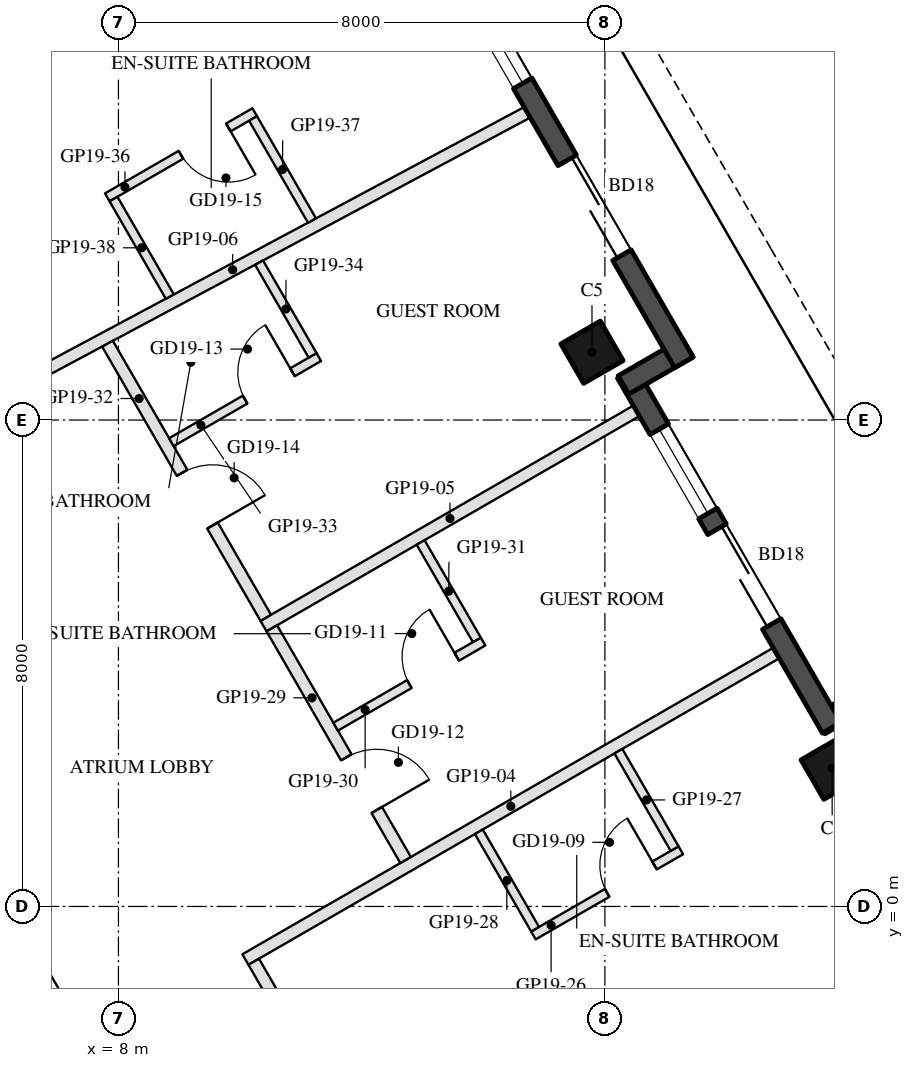
"""IFC4 building model, lengths in metres.
Left out: names, types, materials, properties, quantities, classifications, styles, units other than length and angle.
Written with IfcOpenShell. Run it as: python <this file> out.ifc"""

import sys

from ifc_helpers import new_model, si_unit, direction, frame, frame_2d, origin, origin_2d, place, context, subcontext, project, spatial, rectangle, hollow_rectangle, extrude, element, fill, save


model = new_model("IFC4")
c1 = context("Model", 3, precision=1e-05, world=origin(), true_north=direction((0.0, 1.0)))
c2 = subcontext(c1, "Body", "Model", "MODEL_VIEW")
j1 = project(units=[si_unit("LENGTHUNIT", "METRE"), si_unit("PLANEANGLEUNIT", "RADIAN")], contexts=[c1])
p1 = place(None, origin())
s1 = spatial("IfcSite", under=j1, at=p1, CompositionType="ELEMENT")
p2 = place(p1, origin())
s2 = spatial("IfcBuilding", under=s1, at=p2, CompositionType="ELEMENT")
p3 = place(p2, frame((0.0, 0.0, 202.1)))
s3 = spatial("IfcBuildingStorey", under=s2, at=p3, CompositionType="ELEMENT", Elevation=202.1)
for number, where, z_axis, x_axis in (
    (1, (19.738, 2.273, 0.0), (0.0, 0.0, 1.0), (-0.5, 0.866, 0.0)),
    (2, (15.788, 9.115, 0.0), (0.0, 0.0, 1.0), (-0.5, 0.866, 0.0)),
):
    element("IfcColumn", number, at=place(p3, frame(where, z_axis=z_axis, x_axis=x_axis)), inside=s3, PredefinedType="COLUMN", context=c2, shape_type="SweptSolid", body=[
        extrude(hollow_rectangle(XDim=0.75, YDim=0.75, WallThickness=0.035, at=origin_2d()), origin(), (0.0, 0.0, 1.0), 3.7),
    ])
p4 = place(p3, frame((20.588, 3.601, 0.0), z_axis=(0.0, 0.0, 1.0), x_axis=(-0.866005645448, -0.500034220881, 0.0)))
e3 = element("IfcWall", 3, at=p4, inside=s3, PredefinedType="SOLIDWALL", context=c2, shape_type="SweptSolid", body=[
    extrude(rectangle(XDim=1.22, YDim=0.35, at=frame_2d((0.61, 0.0))), origin(), (0.0, 0.0, 1.0), 3.55),
])
p5 = place(p3, frame((19.729, 2.938, 0.0), z_axis=(0.0, 0.0, 1.0), x_axis=(-0.499976430342, 0.866039011305, 0.0)))
e4 = element("IfcWall", 4, at=p5, inside=s3, PredefinedType="SOLIDWALL", context=c2, shape_type="SweptSolid", body=[
    extrude(rectangle(XDim=6.74, YDim=0.35, at=frame_2d((3.37, 0.0))), origin(), (0.0, 0.0, 1.0), 3.55),
])
p6 = place(p5, frame((1.97, 0.0, 0.0)))
e5 = element("IfcOpeningElement", 5, at=p6, cuts=e4, PredefinedType="OPENING", context=c2, shape_type="SweptSolid", body=[
    extrude(rectangle(XDim=1.8, YDim=2.4, at=frame_2d((0.9, 1.2))), frame((0.0, 0.185, 0.0), z_axis=(0.0, -1.0, 0.0), x_axis=(1.0, 0.0, 0.0)), (0.0, 0.0, 1.0), 0.37),
])
p7 = place(p5, frame((4.07, 0.0, 0.3)))
e6 = element("IfcOpeningElement", 6, at=p7, cuts=e4, PredefinedType="OPENING", context=c2, shape_type="SweptSolid", body=[
    extrude(rectangle(XDim=1.6, YDim=2.65, at=frame_2d((0.8, 1.325))), frame((0.0, 0.185, 0.0), z_axis=(0.0, -1.0, 0.0), x_axis=(1.0, 0.0, 0.0)), (0.0, 0.0, 1.0), 0.37),
])
p8 = place(p3, frame((16.306, 8.577, 0.0), z_axis=(0.0, 0.0, 1.0), x_axis=(0.866092288191, 0.499884134912, 0.0)))
e7 = element("IfcWall", 7, at=p8, inside=s3, PredefinedType="SOLIDWALL", context=c2, shape_type="SweptSolid", body=[
    extrude(rectangle(XDim=1.22, YDim=0.35, at=frame_2d((0.61, 0.0))), origin(), (0.0, 0.0, 1.0), 3.55),
])
p9 = place(p3, frame((17.299, 8.948, 0.0), z_axis=(0.0, 0.0, 1.0), x_axis=(-0.500010041276, 0.866019606374, 0.0)))
e8 = element("IfcWall", 8, at=p9, inside=s3, PredefinedType="SOLIDWALL", context=c2, shape_type="SweptSolid", body=[
    extrude(rectangle(XDim=9.7, YDim=0.35, at=frame_2d((4.85, 0.0))), origin(), (0.0, 0.0, 1.0), 3.55),
])
p10 = place(p9, frame((2.037, 0.0, 0.0)))
e9 = element("IfcOpeningElement", 9, at=p10, cuts=e8, PredefinedType="OPENING", context=c2, shape_type="SweptSolid", body=[
    extrude(rectangle(XDim=1.8, YDim=2.4, at=frame_2d((0.9, 1.2))), frame((0.0, 0.185, 0.0), z_axis=(0.0, -1.0, 0.0), x_axis=(1.0, 0.0, 0.0)), (0.0, 0.0, 1.0), 0.37),
])
p11 = place(p9, frame((5.3, 0.0, 0.3)))
e10 = element("IfcOpeningElement", 10, at=p11, cuts=e8, PredefinedType="OPENING", context=c2, shape_type="SweptSolid", body=[
    extrude(rectangle(XDim=2.7, YDim=2.65, at=frame_2d((1.35, 1.325))), frame((0.0, 0.185, 0.0), z_axis=(0.0, -1.0, 0.0), x_axis=(1.0, 0.0, 0.0)), (0.0, 0.0, 1.0), 0.37),
])
p12 = place(p3, frame((18.818, 4.167, 0.0), z_axis=(0.0, 0.0, 1.0), x_axis=(-0.866039179741, -0.499976138585, 0.0)))
e11 = element("IfcWall", 11, at=p12, inside=s3, PredefinedType="PARTITIONING", context=c2, shape_type="SweptSolid", body=[
    extrude(rectangle(XDim=10.08, YDim=0.2, at=frame_2d((5.04, 0.0))), origin(), (0.0, 0.0, 1.0), 3.06),
])
p13 = place(p3, frame((16.518, 8.151, 0.0), z_axis=(0.0, 0.0, 1.0), x_axis=(-0.866027673501, -0.499996068715, 0.0)))
e12 = element("IfcWall", 12, at=p13, inside=s3, PredefinedType="PARTITIONING", context=c2, shape_type="SweptSolid", body=[
    extrude(rectangle(XDim=7.08, YDim=0.2, at=frame_2d((3.54, 0.0))), origin(), (0.0, 0.0, 1.0), 3.06),
])
p14 = place(p3, frame((14.722, 13.061, 0.0), z_axis=(0.0, 0.0, 1.0), x_axis=(-0.881785716662, -0.471650241059, 0.0)))
e13 = element("IfcWall", 13, at=p14, inside=s3, PredefinedType="PARTITIONING", context=c2, shape_type="SweptSolid", body=[
    extrude(rectangle(XDim=10.986, YDim=0.2, at=frame_2d((5.493, 0.0))), origin(), (0.0, 0.0, 1.0), 2.95),
])
p15 = place(p3, frame((10.225, -0.909, 0.0), z_axis=(0.0, 0.0, 1.0), x_axis=(0.500011931275, -0.86601851515, 0.0)))
e14 = element("IfcWall", 14, at=p15, inside=s3, PredefinedType="PARTITIONING", context=c2, shape_type="SweptSolid", body=[
    extrude(rectangle(XDim=4.088, YDim=0.2, at=frame_2d((2.044, 0.0))), origin(), (0.0, 0.0, 1.0), 2.95),
])
p16 = place(p15, frame((1.544, 0.0, 0.0)))
e15 = element("IfcOpeningElement", 15, at=p16, cuts=e14, PredefinedType="OPENING", context=c2, shape_type="SweptSolid", body=[
    extrude(rectangle(XDim=1.0, YDim=2.1, at=frame_2d((0.5, 1.05))), frame((0.0, 0.11, 0.0), z_axis=(0.0, -1.0, 0.0), x_axis=(1.0, 0.0, 0.0)), (0.0, 0.0, 1.0), 0.22),
])
p17 = place(p3, frame((14.824, -0.477, 0.0), z_axis=(0.0, 0.0, 1.0), x_axis=(0.866034573852, 0.49998411664, 0.0)))
e16 = element("IfcWall", 16, at=p17, inside=s3, PredefinedType="PARTITIONING", context=c2, shape_type="SweptSolid", body=[
    extrude(rectangle(XDim=2.8, YDim=0.15, at=frame_2d((1.4, 0.0))), origin(), (0.0, 0.0, 1.0), 2.95),
])
p18 = place(p17, frame((1.4, 0.0, 0.0)))
e17 = element("IfcOpeningElement", 17, at=p18, cuts=e16, PredefinedType="OPENING", context=c2, shape_type="SweptSolid", body=[
    extrude(rectangle(XDim=0.9, YDim=2.1, at=frame_2d((0.45, 1.05))), frame((0.0, 0.085, 0.0), z_axis=(0.0, -1.0, 0.0), x_axis=(1.0, 0.0, 0.0)), (0.0, 0.0, 1.0), 0.17),
])
for number, where, z_axis, x_axis in (
    (18, (17.147, 0.951, 0.0), (0.0, 0.0, 1.0), (-0.5, 0.866, 0.0)),
    (19, (14.852, -0.374, 0.0), (0.0, 0.0, 1.0), (-0.5, 0.866, 0.0)),
):
    element("IfcWall", number, at=place(p3, frame(where, z_axis=z_axis, x_axis=x_axis)), inside=s3, PredefinedType="PARTITIONING", context=c2, shape_type="SweptSolid", body=[
        extrude(rectangle(XDim=1.85, YDim=0.15, at=frame_2d((0.925, 0.0))), origin(), (0.0, 0.0, 1.0), 3.55),
    ])
p19 = place(p3, frame((10.523, 4.574, 0.0), z_axis=(0.0, 0.0, 1.0), x_axis=(0.499988222896, -0.866032203192, 0.0)))
e20 = element("IfcWall", 20, at=p19, inside=s3, PredefinedType="PARTITIONING", context=c2, shape_type="SweptSolid", body=[
    extrude(rectangle(XDim=4.4, YDim=0.2, at=frame_2d((2.2, 0.0))), origin(), (0.0, 0.0, 1.0), 2.95),
])
p20 = place(p19, frame((2.45, 0.0, 0.0)))
e21 = element("IfcOpeningElement", 21, at=p20, cuts=e20, PredefinedType="OPENING", context=c2, shape_type="SweptSolid", body=[
    extrude(rectangle(XDim=1.0, YDim=2.1, at=frame_2d((0.5, 1.05))), frame((0.0, 0.11, 0.0), z_axis=(0.0, -1.0, 0.0), x_axis=(1.0, 0.0, 0.0)), (0.0, 0.0, 1.0), 0.22),
])
p21 = place(p3, frame((11.572, 2.957, 0.0), z_axis=(0.0, 0.0, 1.0), x_axis=(0.865996816683, 0.500049511043, 0.0)))
e22 = element("IfcWall", 22, at=p21, inside=s3, PredefinedType="PARTITIONING", context=c2, shape_type="SweptSolid", body=[
    extrude(rectangle(XDim=2.8, YDim=0.15, at=frame_2d((1.4, 0.0))), origin(), (0.0, 0.0, 1.0), 3.55),
])
p22 = place(p21, frame((1.4, 0.0, 0.0)))
e23 = element("IfcOpeningElement", 23, at=p22, cuts=e22, PredefinedType="OPENING", context=c2, shape_type="SweptSolid", body=[
    extrude(rectangle(XDim=0.9, YDim=2.1, at=frame_2d((0.45, 1.05))), frame((0.0, 0.085, 0.0), z_axis=(0.0, -1.0, 0.0), x_axis=(1.0, 0.0, 0.0)), (0.0, 0.0, 1.0), 0.17),
])
p23 = place(p3, frame((13.894, 4.385, 0.0), z_axis=(0.0, 0.0, 1.0), x_axis=(-0.499985172903, 0.866033964044, 0.0)))
e24 = element("IfcWall", 24, at=p23, inside=s3, PredefinedType="PARTITIONING", context=c2, shape_type="SweptSolid", body=[
    extrude(rectangle(XDim=1.85, YDim=0.15, at=frame_2d((0.925, 0.0))), origin(), (0.0, 0.0, 1.0), 3.55),
])
p24 = place(p3, frame((7.82, 9.256, 0.0), z_axis=(0.0, 0.0, 1.0), x_axis=(0.499987686533, -0.866032512851, 0.0)))
e25 = element("IfcWall", 25, at=p24, inside=s3, PredefinedType="PARTITIONING", context=c2, shape_type="SweptSolid", body=[
    extrude(rectangle(XDim=5.206, YDim=0.2, at=frame_2d((2.603, 0.0))), origin(), (0.0, 0.0, 1.0), 2.95),
])
p25 = place(p24, frame((2.453, 0.0, 0.0)))
e26 = element("IfcOpeningElement", 26, at=p25, cuts=e25, PredefinedType="OPENING", context=c2, shape_type="SweptSolid", body=[
    extrude(rectangle(XDim=1.0, YDim=2.1, at=frame_2d((0.5, 1.05))), frame((0.0, 0.11, 0.0), z_axis=(0.0, -1.0, 0.0), x_axis=(1.0, 0.0, 0.0)), (0.0, 0.0, 1.0), 0.22),
])
p26 = place(p3, frame((8.871, 7.636, 0.0), z_axis=(0.0, 0.0, 1.0), x_axis=(0.865996816683, 0.500049511043, 0.0)))
e27 = element("IfcWall", 27, at=p26, inside=s3, PredefinedType="PARTITIONING", context=c2, shape_type="SweptSolid", body=[
    extrude(rectangle(XDim=2.8, YDim=0.15, at=frame_2d((1.4, 0.0))), origin(), (0.0, 0.0, 1.0), 3.55),
])
p27 = place(p26, frame((1.4, 0.0, 0.0)))
e28 = element("IfcOpeningElement", 28, at=p27, cuts=e27, PredefinedType="OPENING", context=c2, shape_type="SweptSolid", body=[
    extrude(rectangle(XDim=0.9, YDim=2.1, at=frame_2d((0.45, 1.05))), frame((0.0, 0.085, 0.0), z_axis=(0.0, -1.0, 0.0), x_axis=(1.0, 0.0, 0.0)), (0.0, 0.0, 1.0), 0.17),
])
p28 = place(p3, frame((11.193, 9.063, 0.0), z_axis=(0.0, 0.0, 1.0), x_axis=(-0.499910413417, 0.866077120444, 0.0)))
e29 = element("IfcWall", 29, at=p28, inside=s3, PredefinedType="PARTITIONING", context=c2, shape_type="SweptSolid", body=[
    extrude(rectangle(XDim=1.761, YDim=0.15, at=frame_2d((0.881, 0.0))), origin(), (0.0, 0.0, 1.0), 2.95),
])
p29 = place(p3, frame((10.241, 13.062, 0.0), z_axis=(0.0, 0.0, 1.0), x_axis=(-0.865996816683, -0.500049511043, 0.0)))
e30 = element("IfcWall", 30, at=p29, inside=s3, PredefinedType="PARTITIONING", context=c2, shape_type="SweptSolid", body=[
    extrude(rectangle(XDim=2.8, YDim=0.15, at=frame_2d((1.4, 0.0))), origin(), (0.0, 0.0, 1.0), 3.55),
])
p30 = place(p29, frame((0.5, 0.0, 0.0)))
e31 = element("IfcOpeningElement", 31, at=p30, cuts=e30, PredefinedType="OPENING", context=c2, shape_type="SweptSolid", body=[
    extrude(rectangle(XDim=0.9, YDim=2.1, at=frame_2d((0.45, 1.05))), frame((0.0, 0.085, 0.0), z_axis=(0.0, -1.0, 0.0), x_axis=(1.0, 0.0, 0.0)), (0.0, 0.0, 1.0), 0.17),
])
p31 = place(p3, frame((11.183, 11.281, 0.0), z_axis=(0.0, 0.0, 1.0), x_axis=(-0.500013181875, 0.866017793092, 0.0)))
e32 = element("IfcWall", 32, at=p31, inside=s3, PredefinedType="PARTITIONING", context=c2, shape_type="SweptSolid", body=[
    extrude(rectangle(XDim=1.938, YDim=0.15, at=frame_2d((0.969, 0.0))), origin(), (0.0, 0.0, 1.0), 3.55),
])
p32 = place(p3, frame((8.844, 10.031, 0.0), z_axis=(0.0, 0.0, 1.0), x_axis=(-0.499924019097, 0.866069266935, 0.0)))
e33 = element("IfcWall", 33, at=p32, inside=s3, PredefinedType="PARTITIONING", context=c2, shape_type="SweptSolid", body=[
    extrude(rectangle(XDim=1.852, YDim=0.15, at=frame_2d((0.926, 0.0))), origin(), (0.0, 0.0, 1.0), 3.55),
])
p33 = place(p6, frame((1.8, 0.0, 0.0), z_axis=(0.0, 0.0, 1.0), x_axis=(-1.0, 0.0, 0.0)))
e34 = element("IfcDoor", 34, at=p33, inside=s3, OperationType="SLIDING_TO_LEFT", PredefinedType="DOOR", context=c2, shape_type="SweptSolid", body=[
    extrude(rectangle(XDim=1.8, YDim=2.4, at=frame_2d((0.9, 1.2))), frame((0.0, 0.025, 0.0), z_axis=(0.0, -1.0, 0.0), x_axis=(1.0, 0.0, 0.0)), (0.0, 0.0, 1.0), 0.05),
])
fill(e5, e34)
p34 = place(p7, origin())
e35 = element("IfcWindow", 35, at=p34, inside=s3, PartitioningType="SINGLE_PANEL", PredefinedType="WINDOW", context=c2, shape_type="SweptSolid", body=[
    extrude(rectangle(XDim=1.6, YDim=2.65, at=frame_2d((0.8, 1.325))), frame((0.0, 0.03, 0.0), z_axis=(0.0, -1.0, 0.0), x_axis=(1.0, 0.0, 0.0)), (0.0, 0.0, 1.0), 0.06),
])
fill(e6, e35)
p35 = place(p10, frame((1.8, 0.0, 0.0), z_axis=(0.0, 0.0, 1.0), x_axis=(-1.0, 0.0, 0.0)))
e36 = element("IfcDoor", 36, at=p35, inside=s3, OperationType="SLIDING_TO_LEFT", PredefinedType="DOOR", context=c2, shape_type="SweptSolid", body=[
    extrude(rectangle(XDim=1.8, YDim=2.4, at=frame_2d((0.9, 1.2))), frame((0.0, 0.025, 0.0), z_axis=(0.0, -1.0, 0.0), x_axis=(1.0, 0.0, 0.0)), (0.0, 0.0, 1.0), 0.05),
])
fill(e9, e36)
p36 = place(p11, origin())
e37 = element("IfcWindow", 37, at=p36, inside=s3, PartitioningType="SINGLE_PANEL", PredefinedType="WINDOW", context=c2, shape_type="SweptSolid", body=[
    extrude(rectangle(XDim=2.7, YDim=2.65, at=frame_2d((1.35, 1.325))), frame((0.0, 0.03, 0.0), z_axis=(0.0, -1.0, 0.0), x_axis=(1.0, 0.0, 0.0)), (0.0, 0.0, 1.0), 0.06),
])
fill(e10, e37)
p37 = place(p18, origin())
e38 = element("IfcDoor", 38, at=p37, inside=s3, OperationType="SINGLE_SWING_RIGHT", PredefinedType="DOOR", context=c2, shape_type="SweptSolid", body=[
    extrude(rectangle(XDim=0.9, YDim=2.1, at=frame_2d((0.45, 1.05))), frame((0.0, 0.025, 0.0), z_axis=(0.0, -1.0, 0.0), x_axis=(1.0, 0.0, 0.0)), (0.0, 0.0, 1.0), 0.05),
])
fill(e17, e38)
p38 = place(p22, origin())
e39 = element("IfcDoor", 39, at=p38, inside=s3, OperationType="SINGLE_SWING_RIGHT", PredefinedType="DOOR", context=c2, shape_type="SweptSolid", body=[
    extrude(rectangle(XDim=0.9, YDim=2.1, at=frame_2d((0.45, 1.05))), frame((0.0, 0.025, 0.0), z_axis=(0.0, -1.0, 0.0), x_axis=(1.0, 0.0, 0.0)), (0.0, 0.0, 1.0), 0.05),
])
fill(e23, e39)
p39 = place(p20, origin())
e40 = element("IfcDoor", 40, at=p39, inside=s3, OperationType="SINGLE_SWING_RIGHT", PredefinedType="DOOR", context=c2, shape_type="SweptSolid", body=[
    extrude(rectangle(XDim=1.0, YDim=2.1, at=frame_2d((0.5, 1.05))), frame((0.0, 0.025, 0.0), z_axis=(0.0, -1.0, 0.0), x_axis=(1.0, 0.0, 0.0)), (0.0, 0.0, 1.0), 0.05),
])
fill(e21, e40)
p40 = place(p27, origin())
e41 = element("IfcDoor", 41, at=p40, inside=s3, OperationType="SINGLE_SWING_RIGHT", PredefinedType="DOOR", context=c2, shape_type="SweptSolid", body=[
    extrude(rectangle(XDim=0.9, YDim=2.1, at=frame_2d((0.45, 1.05))), frame((0.0, 0.025, 0.0), z_axis=(0.0, -1.0, 0.0), x_axis=(1.0, 0.0, 0.0)), (0.0, 0.0, 1.0), 0.05),
])
fill(e28, e41)
p41 = place(p25, origin())
e42 = element("IfcDoor", 42, at=p41, inside=s3, OperationType="SINGLE_SWING_RIGHT", PredefinedType="DOOR", context=c2, shape_type="SweptSolid", body=[
    extrude(rectangle(XDim=1.0, YDim=2.1, at=frame_2d((0.5, 1.05))), frame((0.0, 0.025, 0.0), z_axis=(0.0, -1.0, 0.0), x_axis=(1.0, 0.0, 0.0)), (0.0, 0.0, 1.0), 0.05),
])
fill(e26, e42)
p42 = place(p30, origin())
e43 = element("IfcDoor", 43, at=p42, inside=s3, OperationType="SINGLE_SWING_LEFT", PredefinedType="DOOR", context=c2, shape_type="SweptSolid", body=[
    extrude(rectangle(XDim=0.9, YDim=2.1, at=frame_2d((0.45, 1.05))), frame((0.0, 0.025, 0.0), z_axis=(0.0, -1.0, 0.0), x_axis=(1.0, 0.0, 0.0)), (0.0, 0.0, 1.0), 0.05),
])
fill(e31, e43)
save(model, sys.argv[1])
